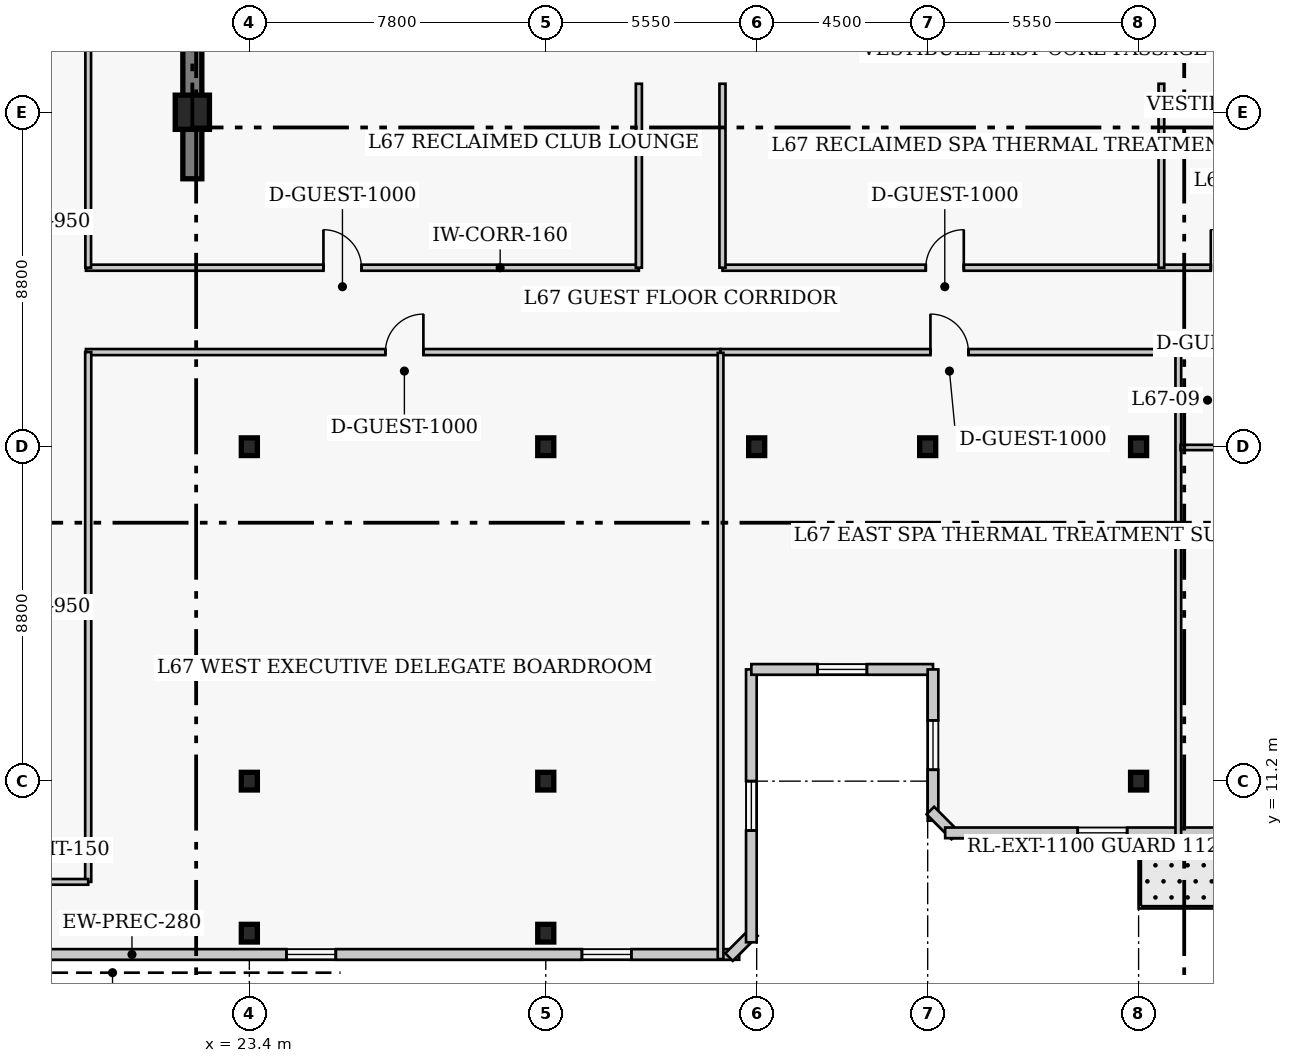
"""IFC4 building model, lengths in metres.
Left out: names, types, materials, properties, quantities, classifications, styles, units other than length and angle.
Written with IfcOpenShell. Run it as: python <this file> out.ifc"""

import sys

from ifc_helpers import new_model, si_unit, direction, frame, frame_2d, origin, origin_2d, place, context, subcontext, project, spatial, rectangle, i_section, extrude, element, fill, save


model = new_model("IFC4")
c1 = context("Model", 3, precision=1e-05, world=origin(), true_north=direction((0.0, 1.0)))
c2 = subcontext(c1, "Body", "Model", "MODEL_VIEW")
j1 = project(units=[si_unit("LENGTHUNIT", "METRE"), si_unit("PLANEANGLEUNIT", "RADIAN")], contexts=[c1])
p1 = place(None, origin())
s1 = spatial("IfcSite", under=j1, at=p1, CompositionType="ELEMENT")
p2 = place(p1, origin())
s2 = spatial("IfcBuilding", under=s1, at=p2, CompositionType="ELEMENT")
p3 = place(p2, frame((0.0, 0.0, 269.4)))
s3 = spatial("IfcBuildingStorey", under=s2, at=p3, CompositionType="ELEMENT", Elevation=269.4)
p4 = place(p3, frame((21.9, 27.05, 0.0), z_axis=(0.0, 0.0, 1.0), x_axis=(0.0, 1.0, 0.0)))
e1 = element("IfcWall", 1, at=p4, inside=s3, PredefinedType="SHEAR", context=c2, shape_type="SweptSolid", body=[
    extrude(rectangle(XDim=13.52, YDim=0.5, at=frame_2d((6.76, 0.0))), origin(), (0.0, 0.0, 1.0), 4.0),
])
for number, where, z_axis, x_axis in (
    (2, (23.4, 11.2, 0.0), (0.0, 0.0, 1.0), (1.0, 0.0, 0.0)),
    (3, (23.4, 20.0, 0.0), (0.0, 0.0, 1.0), (1.0, 0.0, 0.0)),
    (4, (31.2, 11.2, 0.0), (0.0, 0.0, 1.0), (1.0, 0.0, 0.0)),
    (5, (31.2, 20.0, 0.0), (0.0, 0.0, 1.0), (1.0, 0.0, 0.0)),
    (6, (36.75, 20.0, 0.0), (0.0, 0.0, 1.0), (1.0, 0.0, 0.0)),
    (7, (41.25, 20.0, 0.0), (0.0, 0.0, 1.0), (1.0, 0.0, 0.0)),
    (8, (46.8, 11.2, 0.0), (0.0, 0.0, 1.0), (1.0, 0.0, 0.0)),
    (9, (46.8, 20.0, 0.0), (0.0, 0.0, 1.0), (1.0, 0.0, 0.0)),
):
    element("IfcColumn", number, at=place(p3, frame(where, z_axis=z_axis, x_axis=x_axis)), inside=s3, PredefinedType="COLUMN", context=c2, shape_type="SweptSolid", body=[
        extrude(i_section(OverallWidth=0.422, OverallDepth=0.465, WebThickness=0.045, FlangeThickness=0.073, FilletRadius=0.017, at=origin_2d()), origin(), (0.0, 0.0, 1.0), 4.0),
    ])
p5 = place(p3, frame((21.9, 28.8, 0.0), z_axis=(0.0, 0.0, 1.0), x_axis=(1.0, 0.0, 0.0)))
e10 = element("IfcColumn", 10, at=p5, inside=s3, PredefinedType="COLUMN", context=c2, shape_type="SweptSolid", body=[
    extrude(rectangle(XDim=0.9, YDim=0.9, at=origin_2d()), origin(), (0.0, 0.0, 1.0), 4.0),
])
for number, where, z_axis, x_axis in (
    (11, (23.4, 7.2, 0.0), (0.0, 0.0, 1.0), (1.0, 0.0, 0.0)),
    (12, (31.2, 7.2, 0.0), (0.0, 0.0, 1.0), (1.0, 0.0, 0.0)),
):
    element("IfcColumn", number, at=place(p3, frame(where, z_axis=z_axis, x_axis=x_axis)), inside=s3, PredefinedType="COLUMN", context=c2, shape_type="SweptSolid", body=[
        extrude(i_section(OverallWidth=0.422, OverallDepth=0.465, WebThickness=0.045, FlangeThickness=0.073, FilletRadius=0.017, at=origin_2d()), origin(), (0.0, 0.0, 1.0), 4.0),
    ])
p6 = place(p3, frame((11.46, 6.64, 0.0), z_axis=(0.0, 0.0, 1.0), x_axis=(1.0, 0.0, 0.0)))
e13 = element("IfcWall", 13, at=p6, inside=s3, PredefinedType="SOLIDWALL", context=c2, shape_type="SweptSolid", body=[
    extrude(rectangle(XDim=24.83, YDim=0.28, at=frame_2d((12.415, 0.0))), origin(), (0.0, 0.0, 1.0), 3.76),
])
p7 = place(p6, frame((3.488, 0.0, 0.85)))
e14 = element("IfcOpeningElement", 14, at=p7, cuts=e13, PredefinedType="OPENING", context=c2, shape_type="SweptSolid", body=[
    extrude(rectangle(XDim=1.3, YDim=1.7, at=frame_2d((0.65, 0.85))), frame((0.0, 0.15, 0.0), z_axis=(0.0, -1.0, 0.0), x_axis=(1.0, 0.0, 0.0)), (0.0, 0.0, 1.0), 0.3),
])
p8 = place(p6, frame((12.915, 0.0, 0.85)))
e15 = element("IfcOpeningElement", 15, at=p8, cuts=e13, PredefinedType="OPENING", context=c2, shape_type="SweptSolid", body=[
    extrude(rectangle(XDim=1.3, YDim=1.7, at=frame_2d((0.65, 0.85))), frame((0.0, 0.15, 0.0), z_axis=(0.0, -1.0, 0.0), x_axis=(1.0, 0.0, 0.0)), (0.0, 0.0, 1.0), 0.3),
])
p9 = place(p6, frame((20.692, 0.0, 0.85)))
e16 = element("IfcOpeningElement", 16, at=p9, cuts=e13, PredefinedType="OPENING", context=c2, shape_type="SweptSolid", body=[
    extrude(rectangle(XDim=1.3, YDim=1.7, at=frame_2d((0.65, 0.85))), frame((0.0, 0.15, 0.0), z_axis=(0.0, -1.0, 0.0), x_axis=(1.0, 0.0, 0.0)), (0.0, 0.0, 1.0), 0.3),
])
p10 = place(p3, frame((36.023, 6.571, 0.0), z_axis=(0.0, 0.0, 1.0), x_axis=(0.707106781187, 0.707106781187, 0.0)))
e17 = element("IfcWall", 17, at=p10, inside=s3, PredefinedType="SOLIDWALL", context=c2, shape_type="SweptSolid", body=[
    extrude(rectangle(XDim=0.928, YDim=0.28, at=frame_2d((0.464, 0.0))), origin(), (0.0, 0.0, 1.0), 3.76),
])
p11 = place(p3, frame((36.61, 6.96, 0.0), z_axis=(0.0, 0.0, 1.0), x_axis=(0.0, 1.0, 0.0)))
e18 = element("IfcWall", 18, at=p11, inside=s3, PredefinedType="SOLIDWALL", context=c2, shape_type="SweptSolid", body=[
    extrude(rectangle(XDim=7.18, YDim=0.28, at=frame_2d((3.59, 0.0))), origin(), (0.0, 0.0, 1.0), 3.76),
])
p12 = place(p11, frame((2.94, 0.0, 0.85)))
e19 = element("IfcOpeningElement", 19, at=p12, cuts=e18, PredefinedType="OPENING", context=c2, shape_type="SweptSolid", body=[
    extrude(rectangle(XDim=1.3, YDim=1.7, at=frame_2d((0.65, 0.85))), frame((0.0, 0.15, 0.0), z_axis=(0.0, -1.0, 0.0), x_axis=(1.0, 0.0, 0.0)), (0.0, 0.0, 1.0), 0.3),
])
p13 = place(p3, frame((36.61, 14.14, 0.0), z_axis=(0.0, 0.0, 1.0), x_axis=(1.0, 0.0, 0.0)))
e20 = element("IfcWall", 20, at=p13, inside=s3, PredefinedType="SOLIDWALL", context=c2, shape_type="SweptSolid", body=[
    extrude(rectangle(XDim=4.78, YDim=0.28, at=frame_2d((2.39, 0.0))), origin(), (0.0, 0.0, 1.0), 3.76),
])
p14 = place(p13, frame((1.74, 0.0, 0.85)))
e21 = element("IfcOpeningElement", 21, at=p14, cuts=e20, PredefinedType="OPENING", context=c2, shape_type="SweptSolid", body=[
    extrude(rectangle(XDim=1.3, YDim=1.7, at=frame_2d((0.65, 0.85))), frame((0.0, 0.15, 0.0), z_axis=(0.0, -1.0, 0.0), x_axis=(1.0, 0.0, 0.0)), (0.0, 0.0, 1.0), 0.3),
])
p15 = place(p3, frame((41.39, 14.14, 0.0), z_axis=(0.0, 0.0, 1.0), x_axis=(0.0, -1.0, 0.0)))
e22 = element("IfcWall", 22, at=p15, inside=s3, PredefinedType="SOLIDWALL", context=c2, shape_type="SweptSolid", body=[
    extrude(rectangle(XDim=3.98, YDim=0.28, at=frame_2d((1.99, 0.0))), origin(), (0.0, 0.0, 1.0), 3.76),
])
p16 = place(p15, frame((1.34, 0.0, 0.85)))
e23 = element("IfcOpeningElement", 23, at=p16, cuts=e22, PredefinedType="OPENING", context=c2, shape_type="SweptSolid", body=[
    extrude(rectangle(XDim=1.3, YDim=1.7, at=frame_2d((0.65, 0.85))), frame((0.0, 0.15, 0.0), z_axis=(0.0, -1.0, 0.0), x_axis=(1.0, 0.0, 0.0)), (0.0, 0.0, 1.0), 0.3),
])
p17 = place(p3, frame((41.321, 10.427, 0.0), z_axis=(0.0, 0.0, 1.0), x_axis=(0.707106781187, -0.707106781187, 0.0)))
e24 = element("IfcWall", 24, at=p17, inside=s3, PredefinedType="SOLIDWALL", context=c2, shape_type="SweptSolid", body=[
    extrude(rectangle(XDim=0.928, YDim=0.28, at=frame_2d((0.464, 0.0))), origin(), (0.0, 0.0, 1.0), 3.76),
])
p18 = place(p3, frame((41.71, 9.84, 0.0), z_axis=(0.0, 0.0, 1.0), x_axis=(1.0, 0.0, 0.0)))
e25 = element("IfcWall", 25, at=p18, inside=s3, PredefinedType="SOLIDWALL", context=c2, shape_type="SweptSolid", body=[
    extrude(rectangle(XDim=24.83, YDim=0.28, at=frame_2d((12.415, 0.0))), origin(), (0.0, 0.0, 1.0), 3.76),
])
p19 = place(p18, frame((8.29, 0.0, 0.0)))
e26 = element("IfcOpeningElement", 26, at=p19, cuts=e25, PredefinedType="OPENING", context=c2, shape_type="SweptSolid", body=[
    extrude(rectangle(XDim=1.4, YDim=2.15, at=frame_2d((0.7, 1.075))), frame((0.0, 0.15, 0.0), z_axis=(0.0, -1.0, 0.0), x_axis=(1.0, 0.0, 0.0)), (0.0, 0.0, 1.0), 0.3),
])
p20 = place(p18, frame((3.488, 0.0, 0.85)))
e27 = element("IfcOpeningElement", 27, at=p20, cuts=e25, PredefinedType="OPENING", context=c2, shape_type="SweptSolid", body=[
    extrude(rectangle(XDim=1.3, YDim=1.7, at=frame_2d((0.65, 0.85))), frame((0.0, 0.15, 0.0), z_axis=(0.0, -1.0, 0.0), x_axis=(1.0, 0.0, 0.0)), (0.0, 0.0, 1.0), 0.3),
])
p21 = place(p18, frame((11.115, 0.0, 0.85)))
e28 = element("IfcOpeningElement", 28, at=p21, cuts=e25, PredefinedType="OPENING", context=c2, shape_type="SweptSolid", body=[
    extrude(rectangle(XDim=1.3, YDim=1.7, at=frame_2d((0.65, 0.85))), frame((0.0, 0.15, 0.0), z_axis=(0.0, -1.0, 0.0), x_axis=(1.0, 0.0, 0.0)), (0.0, 0.0, 1.0), 0.3),
])
p22 = place(p18, frame((18.892, 0.0, 0.85)))
e29 = element("IfcOpeningElement", 29, at=p22, cuts=e25, PredefinedType="OPENING", context=c2, shape_type="SweptSolid", body=[
    extrude(rectangle(XDim=1.3, YDim=1.7, at=frame_2d((0.65, 0.85))), frame((0.0, 0.15, 0.0), z_axis=(0.0, -1.0, 0.0), x_axis=(1.0, 0.0, 0.0)), (0.0, 0.0, 1.0), 0.3),
])
p23 = place(p3, frame((19.1, 24.71, 0.0), z_axis=(0.0, 0.0, 1.0), x_axis=(1.0, 0.0, 0.0)))
e30 = element("IfcWall", 30, at=p23, inside=s3, PredefinedType="PARTITIONING", context=c2, shape_type="SweptSolid", body=[
    extrude(rectangle(XDim=14.55, YDim=0.16, at=frame_2d((7.275, 0.0))), origin(), (0.0, 0.0, 1.0), 3.76),
])
p24 = place(p23, frame((6.25, 0.0, 0.0)))
e31 = element("IfcOpeningElement", 31, at=p24, cuts=e30, PredefinedType="OPENING", context=c2, shape_type="SweptSolid", body=[
    extrude(rectangle(XDim=1.0, YDim=2.15, at=frame_2d((0.5, 1.075))), frame((0.0, 0.09, 0.0), z_axis=(0.0, -1.0, 0.0), x_axis=(1.0, 0.0, 0.0)), (0.0, 0.0, 1.0), 0.18),
])
p25 = place(p3, frame((35.85, 24.71, 0.0), z_axis=(0.0, 0.0, 1.0), x_axis=(1.0, 0.0, 0.0)))
e32 = element("IfcWall", 32, at=p25, inside=s3, PredefinedType="PARTITIONING", context=c2, shape_type="SweptSolid", body=[
    extrude(rectangle(XDim=23.0, YDim=0.16, at=frame_2d((11.5, 0.0))), origin(), (0.0, 0.0, 1.0), 3.76),
])
p26 = place(p25, frame((5.35, 0.0, 0.0)))
e33 = element("IfcOpeningElement", 33, at=p26, cuts=e32, PredefinedType="OPENING", context=c2, shape_type="SweptSolid", body=[
    extrude(rectangle(XDim=1.0, YDim=2.15, at=frame_2d((0.5, 1.075))), frame((0.0, 0.09, 0.0), z_axis=(0.0, -1.0, 0.0), x_axis=(1.0, 0.0, 0.0)), (0.0, 0.0, 1.0), 0.18),
])
p27 = place(p25, frame((12.85, 0.0, 0.0)))
e34 = element("IfcOpeningElement", 34, at=p27, cuts=e32, PredefinedType="OPENING", context=c2, shape_type="SweptSolid", body=[
    extrude(rectangle(XDim=1.0, YDim=2.15, at=frame_2d((0.5, 1.075))), frame((0.0, 0.09, 0.0), z_axis=(0.0, -1.0, 0.0), x_axis=(1.0, 0.0, 0.0)), (0.0, 0.0, 1.0), 0.18),
])
for number, where, z_axis, x_axis in (
    (35, (33.65, 24.71, 0.0), (0.0, 0.0, 1.0), (0.0, 1.0, 0.0)),
    (36, (35.85, 24.71, 0.0), (0.0, 0.0, 1.0), (0.0, 1.0, 0.0)),
):
    element("IfcWall", number, at=place(p3, frame(where, z_axis=z_axis, x_axis=x_axis)), inside=s3, PredefinedType="PARTITIONING", context=c2, shape_type="SweptSolid", body=[
        extrude(rectangle(XDim=4.84, YDim=0.16, at=frame_2d((2.42, 0.0))), origin(), (0.0, 0.0, 1.0), 3.76),
    ])
p28 = place(p3, frame((19.1, 22.49, 0.0), z_axis=(0.0, 0.0, 1.0), x_axis=(1.0, 0.0, 0.0)))
e37 = element("IfcWall", 37, at=p28, inside=s3, PredefinedType="PARTITIONING", context=c2, shape_type="SweptSolid", body=[
    extrude(rectangle(XDim=16.7, YDim=0.16, at=frame_2d((8.35, 0.0))), origin(), (0.0, 0.0, 1.0), 3.76),
])
p29 = place(p28, frame((7.88, 0.0, 0.0)))
e38 = element("IfcOpeningElement", 38, at=p29, cuts=e37, PredefinedType="OPENING", context=c2, shape_type="SweptSolid", body=[
    extrude(rectangle(XDim=1.0, YDim=2.15, at=frame_2d((0.5, 1.075))), frame((0.0, 0.09, 0.0), z_axis=(0.0, -1.0, 0.0), x_axis=(1.0, 0.0, 0.0)), (0.0, 0.0, 1.0), 0.18),
])
p30 = place(p3, frame((35.8, 22.49, 0.0), z_axis=(0.0, 0.0, 1.0), x_axis=(1.0, 0.0, 0.0)))
e39 = element("IfcWall", 39, at=p30, inside=s3, PredefinedType="PARTITIONING", context=c2, shape_type="SweptSolid", body=[
    extrude(rectangle(XDim=25.21, YDim=0.16, at=frame_2d((12.605, 0.0))), origin(), (0.0, 0.0, 1.0), 3.76),
])
p31 = place(p30, frame((5.522, 0.0, 0.0)))
e40 = element("IfcOpeningElement", 40, at=p31, cuts=e39, PredefinedType="OPENING", context=c2, shape_type="SweptSolid", body=[
    extrude(rectangle(XDim=1.0, YDim=2.15, at=frame_2d((0.5, 1.075))), frame((0.0, 0.09, 0.0), z_axis=(0.0, -1.0, 0.0), x_axis=(1.0, 0.0, 0.0)), (0.0, 0.0, 1.0), 0.18),
])
p32 = place(p30, frame((18.198, 0.0, 0.0)))
e41 = element("IfcOpeningElement", 41, at=p32, cuts=e39, PredefinedType="OPENING", context=c2, shape_type="SweptSolid", body=[
    extrude(rectangle(XDim=0.95, YDim=2.1, at=frame_2d((0.475, 1.05))), frame((0.0, 0.09, 0.0), z_axis=(0.0, -1.0, 0.0), x_axis=(1.0, 0.0, 0.0)), (0.0, 0.0, 1.0), 0.18),
])
p33 = place(p30, frame((23.665, 0.0, 0.0)))
e42 = element("IfcOpeningElement", 42, at=p33, cuts=e39, PredefinedType="OPENING", context=c2, shape_type="SweptSolid", body=[
    extrude(rectangle(XDim=0.95, YDim=2.1, at=frame_2d((0.475, 1.05))), frame((0.0, 0.09, 0.0), z_axis=(0.0, -1.0, 0.0), x_axis=(1.0, 0.0, 0.0)), (0.0, 0.0, 1.0), 0.18),
])
p34 = place(p3, frame((19.16, 8.55, 0.0), z_axis=(0.0, 0.0, 1.0), x_axis=(0.0, 1.0, 0.0)))
e43 = element("IfcWall", 43, at=p34, inside=s3, PredefinedType="PARTITIONING", context=c2, shape_type="SweptSolid", body=[
    extrude(rectangle(XDim=13.94, YDim=0.16, at=frame_2d((6.97, 0.0))), origin(), (0.0, 0.0, 1.0), 3.76),
])
p35 = place(p3, frame((16.94, 8.55, 0.0), z_axis=(0.0, 0.0, 1.0), x_axis=(1.0, 0.0, 0.0)))
e44 = element("IfcWall", 44, at=p35, inside=s3, PredefinedType="PARTITIONING", context=c2, shape_type="SweptSolid", body=[
    extrude(rectangle(XDim=2.22, YDim=0.15, at=frame_2d((1.11, 0.0))), origin(), (0.0, 0.0, 1.0), 3.76),
])
p36 = place(p3, frame((19.16, 24.71, 0.0), z_axis=(0.0, 0.0, 1.0), x_axis=(0.0, 1.0, 0.0)))
e45 = element("IfcWall", 45, at=p36, inside=s3, PredefinedType="PARTITIONING", context=c2, shape_type="SweptSolid", body=[
    extrude(rectangle(XDim=8.09, YDim=0.15, at=frame_2d((4.045, 0.0))), origin(), (0.0, 0.0, 1.0), 3.76),
])
p37 = place(p3, frame((47.4, 24.71, 0.0), z_axis=(0.0, 0.0, 1.0), x_axis=(0.0, 1.0, 0.0)))
e46 = element("IfcWall", 46, at=p37, inside=s3, PredefinedType="PARTITIONING", context=c2, shape_type="SweptSolid", body=[
    extrude(rectangle(XDim=4.84, YDim=0.15, at=frame_2d((2.42, 0.0))), origin(), (0.0, 0.0, 1.0), 3.76),
])
p38 = place(p3, frame((35.8, 6.52, 0.0), z_axis=(0.0, 0.0, 1.0), x_axis=(0.0, 1.0, 0.0)))
e47 = element("IfcWall", 47, at=p38, inside=s3, PredefinedType="PARTITIONING", context=c2, shape_type="SweptSolid", body=[
    extrude(rectangle(XDim=15.95, YDim=0.15, at=frame_2d((7.975, 0.0))), origin(), (0.0, 0.0, 1.0), 3.76),
])
p39 = place(p3, frame((47.845, 9.72, 0.0), z_axis=(0.0, 0.0, 1.0), x_axis=(0.0, 1.0, 0.0)))
e48 = element("IfcWall", 48, at=p39, inside=s3, PredefinedType="PARTITIONING", context=c2, shape_type="SweptSolid", body=[
    extrude(rectangle(XDim=12.77, YDim=0.15, at=frame_2d((6.385, 0.0))), origin(), (0.0, 0.0, 1.0), 3.76),
])
p40 = place(p3, frame((47.905, 19.98, 0.0), z_axis=(0.0, 0.0, 1.0), x_axis=(1.0, 0.0, 0.0)))
e49 = element("IfcWall", 49, at=p40, inside=s3, PredefinedType="PLUMBINGWALL", context=c2, shape_type="SweptSolid", body=[
    extrude(rectangle(XDim=2.25, YDim=0.14, at=frame_2d((1.125, 0.0))), origin(), (0.0, 0.0, 1.0), 3.064),
])
p41 = place(p8, origin())
e50 = element("IfcWindow", 50, at=p41, inside=s3, PartitioningType="SINGLE_PANEL", PredefinedType="WINDOW", context=c2, shape_type="SweptSolid", body=[
    extrude(rectangle(XDim=1.3, YDim=1.7, at=frame_2d((0.65, 0.85))), frame((0.0, 0.03, 0.0), z_axis=(0.0, -1.0, 0.0), x_axis=(1.0, 0.0, 0.0)), (0.0, 0.0, 1.0), 0.06),
])
fill(e15, e50)
p42 = place(p9, origin())
e51 = element("IfcWindow", 51, at=p42, inside=s3, PartitioningType="SINGLE_PANEL", PredefinedType="WINDOW", context=c2, shape_type="SweptSolid", body=[
    extrude(rectangle(XDim=1.3, YDim=1.7, at=frame_2d((0.65, 0.85))), frame((0.0, 0.03, 0.0), z_axis=(0.0, -1.0, 0.0), x_axis=(1.0, 0.0, 0.0)), (0.0, 0.0, 1.0), 0.06),
])
fill(e16, e51)
p43 = place(p12, origin())
e52 = element("IfcWindow", 52, at=p43, inside=s3, PartitioningType="SINGLE_PANEL", PredefinedType="WINDOW", context=c2, shape_type="SweptSolid", body=[
    extrude(rectangle(XDim=1.3, YDim=1.7, at=frame_2d((0.65, 0.85))), frame((0.0, 0.03, 0.0), z_axis=(0.0, -1.0, 0.0), x_axis=(1.0, 0.0, 0.0)), (0.0, 0.0, 1.0), 0.06),
])
fill(e19, e52)
p44 = place(p14, origin())
e53 = element("IfcWindow", 53, at=p44, inside=s3, PartitioningType="SINGLE_PANEL", PredefinedType="WINDOW", context=c2, shape_type="SweptSolid", body=[
    extrude(rectangle(XDim=1.3, YDim=1.7, at=frame_2d((0.65, 0.85))), frame((0.0, 0.03, 0.0), z_axis=(0.0, -1.0, 0.0), x_axis=(1.0, 0.0, 0.0)), (0.0, 0.0, 1.0), 0.06),
])
fill(e21, e53)
p45 = place(p16, origin())
e54 = element("IfcWindow", 54, at=p45, inside=s3, PartitioningType="SINGLE_PANEL", PredefinedType="WINDOW", context=c2, shape_type="SweptSolid", body=[
    extrude(rectangle(XDim=1.3, YDim=1.7, at=frame_2d((0.65, 0.85))), frame((0.0, 0.03, 0.0), z_axis=(0.0, -1.0, 0.0), x_axis=(1.0, 0.0, 0.0)), (0.0, 0.0, 1.0), 0.06),
])
fill(e23, e54)
p46 = place(p20, origin())
e55 = element("IfcWindow", 55, at=p46, inside=s3, PartitioningType="SINGLE_PANEL", PredefinedType="WINDOW", context=c2, shape_type="SweptSolid", body=[
    extrude(rectangle(XDim=1.3, YDim=1.7, at=frame_2d((0.65, 0.85))), frame((0.0, 0.03, 0.0), z_axis=(0.0, -1.0, 0.0), x_axis=(1.0, 0.0, 0.0)), (0.0, 0.0, 1.0), 0.06),
])
fill(e27, e55)
p47 = place(p24, origin())
e56 = element("IfcDoor", 56, at=p47, inside=s3, OperationType="SINGLE_SWING_LEFT", PredefinedType="DOOR", context=c2, shape_type="SweptSolid", body=[
    extrude(rectangle(XDim=1.0, YDim=2.15, at=frame_2d((0.5, 1.075))), frame((0.0, 0.025, 0.0), z_axis=(0.0, -1.0, 0.0), x_axis=(1.0, 0.0, 0.0)), (0.0, 0.0, 1.0), 0.05),
])
fill(e31, e56)
p48 = place(p26, origin())
e57 = element("IfcDoor", 57, at=p48, inside=s3, OperationType="SINGLE_SWING_RIGHT", PredefinedType="DOOR", context=c2, shape_type="SweptSolid", body=[
    extrude(rectangle(XDim=1.0, YDim=2.15, at=frame_2d((0.5, 1.075))), frame((0.0, 0.025, 0.0), z_axis=(0.0, -1.0, 0.0), x_axis=(1.0, 0.0, 0.0)), (0.0, 0.0, 1.0), 0.05),
])
fill(e33, e57)
p49 = place(p27, origin())
e58 = element("IfcDoor", 58, at=p49, inside=s3, OperationType="SINGLE_SWING_LEFT", PredefinedType="DOOR", context=c2, shape_type="SweptSolid", body=[
    extrude(rectangle(XDim=1.0, YDim=2.15, at=frame_2d((0.5, 1.075))), frame((0.0, 0.025, 0.0), z_axis=(0.0, -1.0, 0.0), x_axis=(1.0, 0.0, 0.0)), (0.0, 0.0, 1.0), 0.05),
])
fill(e34, e58)
p50 = place(p29, origin())
e59 = element("IfcDoor", 59, at=p50, inside=s3, OperationType="SINGLE_SWING_RIGHT", PredefinedType="DOOR", context=c2, shape_type="SweptSolid", body=[
    extrude(rectangle(XDim=1.0, YDim=2.15, at=frame_2d((0.5, 1.075))), frame((0.0, 0.025, 0.0), z_axis=(0.0, -1.0, 0.0), x_axis=(1.0, 0.0, 0.0)), (0.0, 0.0, 1.0), 0.05),
])
fill(e38, e59)
p51 = place(p31, origin())
e60 = element("IfcDoor", 60, at=p51, inside=s3, OperationType="SINGLE_SWING_LEFT", PredefinedType="DOOR", context=c2, shape_type="SweptSolid", body=[
    extrude(rectangle(XDim=1.0, YDim=2.15, at=frame_2d((0.5, 1.075))), frame((0.0, 0.025, 0.0), z_axis=(0.0, -1.0, 0.0), x_axis=(1.0, 0.0, 0.0)), (0.0, 0.0, 1.0), 0.05),
])
fill(e40, e60)
save(model, sys.argv[1])
